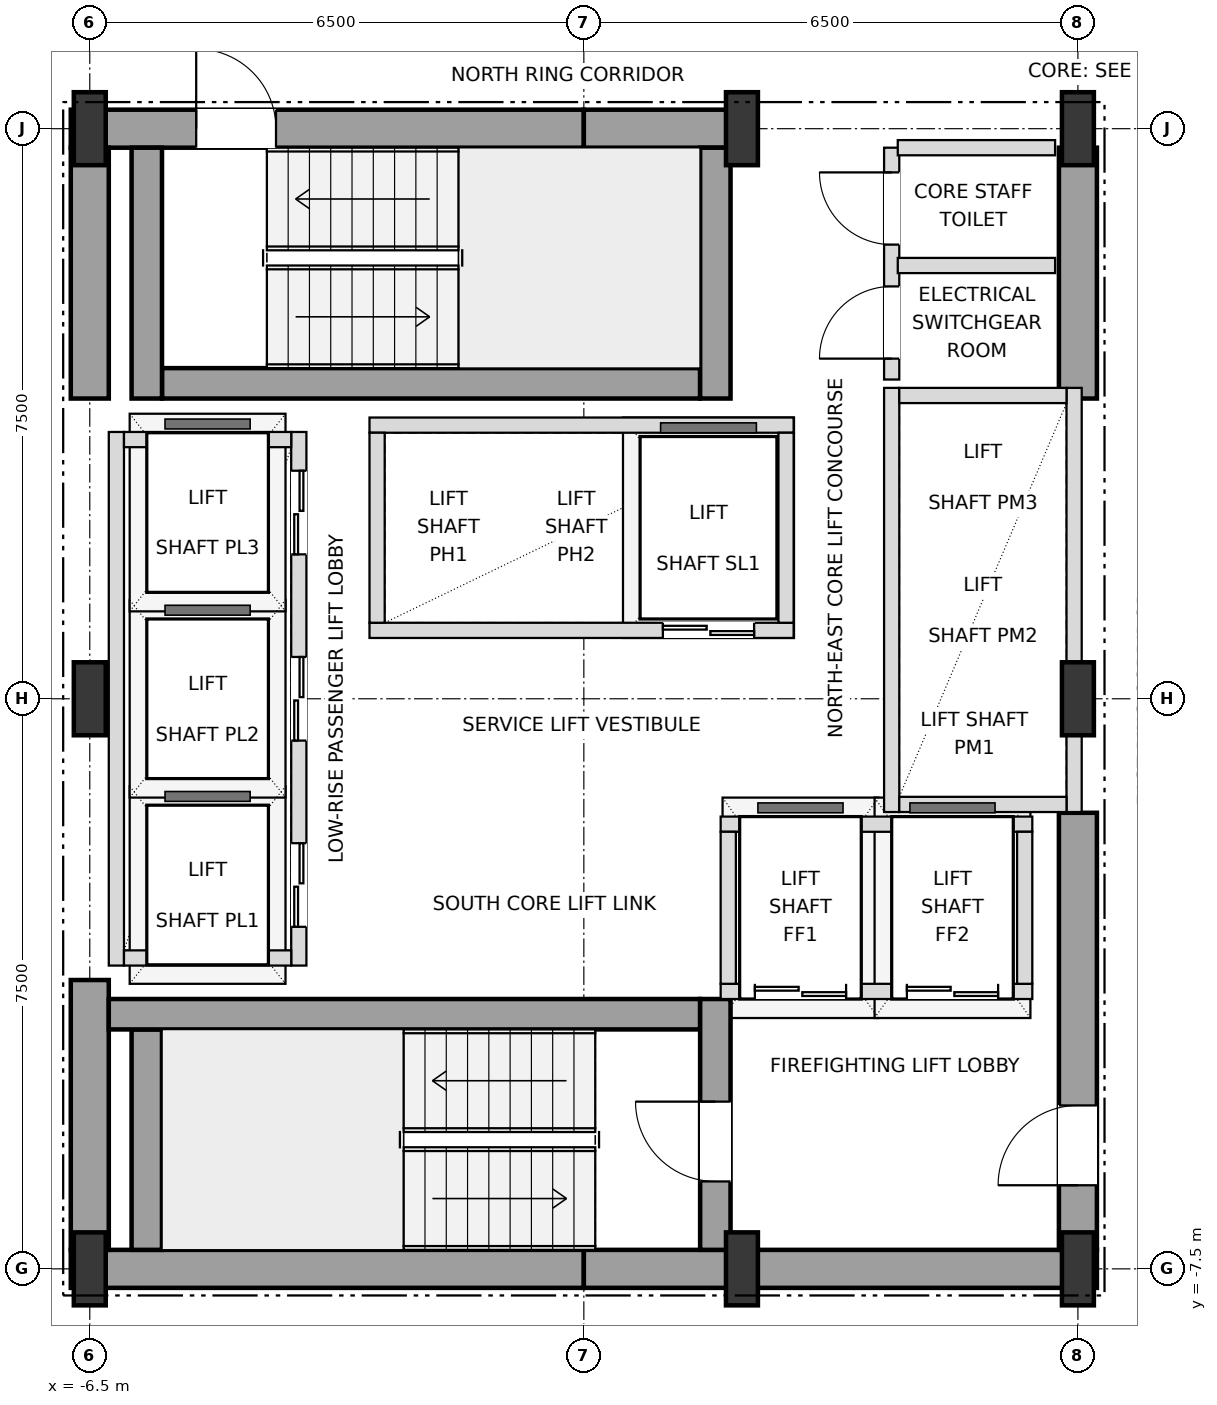
"""IFC4 building model, lengths in metres.
Left out: names, types, materials, properties, quantities, classifications, styles, units other than length and angle.
Written with IfcOpenShell. Run it as: python <this file> out.ifc"""

import sys

from ifc_helpers import new_model, si_unit, direction, frame, frame_2d, origin, origin_2d, place, context, subcontext, project, spatial, rectangle, i_section, extrude, element, fill, save


model = new_model("IFC4")
c1 = context("Model", 3, precision=1e-05, world=origin(), true_north=direction((0.0, 1.0)))
c2 = subcontext(c1, "Body", "Model", "MODEL_VIEW")
j1 = project(units=[si_unit("LENGTHUNIT", "METRE"), si_unit("PLANEANGLEUNIT", "RADIAN")], contexts=[c1])
p1 = place(None, origin())
s1 = spatial("IfcSite", under=j1, at=p1, CompositionType="ELEMENT")
p2 = place(p1, origin())
s2 = spatial("IfcBuilding", under=s1, at=p2, CompositionType="ELEMENT")
p3 = place(p2, frame((0.0, 0.0, 61.2)))
s3 = spatial("IfcBuildingStorey", under=s2, at=p3, CompositionType="ELEMENT", Elevation=61.2)
for number, where, z_axis, x_axis in (
    (1, (-6.5, -7.5, 0.0), (0.0, 0.0, 1.0), (1.0, 0.0, 0.0)),
    (2, (2.08, -7.5, 0.0), (0.0, 0.0, 1.0), (1.0, 0.0, 0.0)),
    (3, (6.5, -7.5, 0.0), (0.0, 0.0, 1.0), (1.0, 0.0, 0.0)),
    (4, (-6.5, 0.0, 0.0), (0.0, 0.0, 1.0), (1.0, 0.0, 0.0)),
    (5, (6.5, 0.0, 0.0), (0.0, 0.0, 1.0), (1.0, 0.0, 0.0)),
    (6, (-6.5, 7.5, 0.0), (0.0, 0.0, 1.0), (1.0, 0.0, 0.0)),
    (7, (2.08, 7.5, 0.0), (0.0, 0.0, 1.0), (1.0, 0.0, 0.0)),
    (8, (6.5, 7.5, 0.0), (0.0, 0.0, 1.0), (1.0, 0.0, 0.0)),
):
    element("IfcColumn", number, at=place(p3, frame(where, z_axis=z_axis, x_axis=x_axis)), inside=s3, PredefinedType="COLUMN", context=c2, shape_type="SweptSolid", body=[
        extrude(i_section(OverallWidth=0.42, OverallDepth=0.96, WebThickness=0.022, FlangeThickness=0.034, at=origin_2d()), origin(), (0.0, 0.0, 1.0), 3.6),
    ])
for number, where, z_axis, x_axis in (
    (9, (-6.75, -7.5, 0.0), (0.0, 0.0, 1.0), (1.0, 0.0, 0.0)),
    (10, (0.0, -7.5, 0.0), (0.0, 0.0, 1.0), (1.0, 0.0, 0.0)),
):
    element("IfcWall", number, at=place(p3, frame(where, z_axis=z_axis, x_axis=x_axis)), inside=s3, PredefinedType="SHEAR", context=c2, shape_type="SweptSolid", body=[
        extrude(rectangle(XDim=6.75, YDim=0.5, at=frame_2d((3.375, 0.0))), origin(), (0.0, 0.0, 1.0), 3.38),
    ])
p4 = place(p3, frame((-6.75, 7.5, 0.0), z_axis=(0.0, 0.0, 1.0), x_axis=(1.0, 0.0, 0.0)))
e11 = element("IfcWall", 11, at=p4, inside=s3, PredefinedType="SHEAR", context=c2, shape_type="SweptSolid", body=[
    extrude(rectangle(XDim=6.75, YDim=0.5, at=frame_2d((3.375, 0.0))), origin(), (0.0, 0.0, 1.0), 3.38),
])
p5 = place(p4, frame((1.65, 0.0, 0.0)))
e12 = element("IfcOpeningElement", 12, at=p5, cuts=e11, PredefinedType="OPENING", context=c2, shape_type="SweptSolid", body=[
    extrude(rectangle(XDim=1.05, YDim=2.15, at=frame_2d((0.525, 1.075))), frame((0.0, 0.26, 0.0), z_axis=(0.0, -1.0, 0.0), x_axis=(1.0, 0.0, 0.0)), (0.0, 0.0, 1.0), 0.52),
])
p6 = place(p3, frame((0.0, 7.5, 0.0), z_axis=(0.0, 0.0, 1.0), x_axis=(1.0, 0.0, 0.0)))
e13 = element("IfcWall", 13, at=p6, inside=s3, PredefinedType="SHEAR", context=c2, shape_type="SweptSolid", body=[
    extrude(rectangle(XDim=2.08, YDim=0.5, at=frame_2d((1.04, 0.0))), origin(), (0.0, 0.0, 1.0), 3.38),
])
p7 = place(p3, frame((-6.5, -7.25, 0.0), z_axis=(0.0, 0.0, 1.0), x_axis=(0.0, 1.0, 0.0)))
e14 = element("IfcWall", 14, at=p7, inside=s3, PredefinedType="SHEAR", context=c2, shape_type="SweptSolid", body=[
    extrude(rectangle(XDim=3.55, YDim=0.5, at=frame_2d((1.775, 0.0))), origin(), (0.0, 0.0, 1.0), 3.38),
])
p8 = place(p3, frame((-6.5, 3.95, 0.0), z_axis=(0.0, 0.0, 1.0), x_axis=(0.0, 1.0, 0.0)))
e15 = element("IfcWall", 15, at=p8, inside=s3, PredefinedType="SHEAR", context=c2, shape_type="SweptSolid", body=[
    extrude(rectangle(XDim=3.3, YDim=0.5, at=frame_2d((1.65, 0.0))), origin(), (0.0, 0.0, 1.0), 3.38),
])
p9 = place(p3, frame((6.5, -7.25, 0.0), z_axis=(0.0, 0.0, 1.0), x_axis=(0.0, 1.0, 0.0)))
e16 = element("IfcWall", 16, at=p9, inside=s3, PredefinedType="SHEAR", context=c2, shape_type="SweptSolid", body=[
    extrude(rectangle(XDim=5.75, YDim=0.5, at=frame_2d((2.875, 0.0))), origin(), (0.0, 0.0, 1.0), 3.38),
])
p10 = place(p9, frame((0.85, 0.0, 0.0)))
e17 = element("IfcOpeningElement", 17, at=p10, cuts=e16, PredefinedType="OPENING", context=c2, shape_type="SweptSolid", body=[
    extrude(rectangle(XDim=1.05, YDim=2.15, at=frame_2d((0.525, 1.075))), frame((0.0, 0.26, 0.0), z_axis=(0.0, -1.0, 0.0), x_axis=(1.0, 0.0, 0.0)), (0.0, 0.0, 1.0), 0.52),
])
p11 = place(p3, frame((6.5, 3.95, 0.0), z_axis=(0.0, 0.0, 1.0), x_axis=(0.0, 1.0, 0.0)))
e18 = element("IfcWall", 18, at=p11, inside=s3, PredefinedType="SHEAR", context=c2, shape_type="SweptSolid", body=[
    extrude(rectangle(XDim=3.3, YDim=0.5, at=frame_2d((1.65, 0.0))), origin(), (0.0, 0.0, 1.0), 3.38),
])
p12 = place(p3, frame((-5.75, -7.25, 0.0), z_axis=(0.0, 0.0, 1.0), x_axis=(0.0, 1.0, 0.0)))
e19 = element("IfcWall", 19, at=p12, inside=s3, PredefinedType="SHEAR", context=c2, shape_type="SweptSolid", body=[
    extrude(rectangle(XDim=2.9, YDim=0.4, at=frame_2d((1.45, 0.0))), origin(), (0.0, 0.0, 1.0), 3.38),
])
p13 = place(p3, frame((-6.25, -4.15, 0.0), z_axis=(0.0, 0.0, 1.0), x_axis=(1.0, 0.0, 0.0)))
e20 = element("IfcWall", 20, at=p13, inside=s3, PredefinedType="SHEAR", context=c2, shape_type="SweptSolid", body=[
    extrude(rectangle(XDim=7.78, YDim=0.4, at=frame_2d((3.89, 0.0))), origin(), (0.0, 0.0, 1.0), 3.38),
])
p14 = place(p3, frame((1.73, -7.25, 0.0), z_axis=(0.0, 0.0, 1.0), x_axis=(0.0, 1.0, 0.0)))
e21 = element("IfcWall", 21, at=p14, inside=s3, PredefinedType="SHEAR", context=c2, shape_type="SweptSolid", body=[
    extrude(rectangle(XDim=3.3, YDim=0.4, at=frame_2d((1.65, 0.0))), origin(), (0.0, 0.0, 1.0), 3.38),
])
p15 = place(p14, frame((0.9, 0.0, 0.0)))
e22 = element("IfcOpeningElement", 22, at=p15, cuts=e21, PredefinedType="OPENING", context=c2, shape_type="SweptSolid", body=[
    extrude(rectangle(XDim=1.05, YDim=2.15, at=frame_2d((0.525, 1.075))), frame((0.0, 0.21, 0.0), z_axis=(0.0, -1.0, 0.0), x_axis=(1.0, 0.0, 0.0)), (0.0, 0.0, 1.0), 0.42),
])
p16 = place(p3, frame((-5.55, 4.15, 0.0), z_axis=(0.0, 0.0, 1.0), x_axis=(1.0, 0.0, 0.0)))
e23 = element("IfcWall", 23, at=p16, inside=s3, PredefinedType="SHEAR", context=c2, shape_type="SweptSolid", body=[
    extrude(rectangle(XDim=7.08, YDim=0.4, at=frame_2d((3.54, 0.0))), origin(), (0.0, 0.0, 1.0), 3.38),
])
for number, where, z_axis, x_axis in (
    (24, (1.73, 3.95, 0.0), (0.0, 0.0, 1.0), (0.0, 1.0, 0.0)),
    (25, (-5.75, 3.95, 0.0), (0.0, 0.0, 1.0), (0.0, 1.0, 0.0)),
):
    element("IfcWall", number, at=place(p3, frame(where, z_axis=z_axis, x_axis=x_axis)), inside=s3, PredefinedType="SHEAR", context=c2, shape_type="SweptSolid", body=[
        extrude(rectangle(XDim=3.3, YDim=0.4, at=frame_2d((1.65, 0.0))), origin(), (0.0, 0.0, 1.0), 3.38),
    ])
p17 = place(p3, frame((-3.75, -3.51, 0.0), z_axis=(0.0, 0.0, 1.0), x_axis=(0.0, 1.0, 0.0)))
e26 = element("IfcWall", 26, at=p17, inside=s3, PredefinedType="SOLIDWALL", context=c2, shape_type="SweptSolid", body=[
    extrude(rectangle(XDim=7.02, YDim=0.2, at=frame_2d((3.51, 0.0))), origin(), (0.0, 0.0, 1.0), 3.38),
])
p18 = place(p17, frame((0.51, 0.0, 0.0)))
e27 = element("IfcOpeningElement", 27, at=p18, cuts=e26, PredefinedType="OPENING", context=c2, shape_type="SweptSolid", body=[
    extrude(rectangle(XDim=1.1, YDim=2.15, at=frame_2d((0.55, 1.075))), frame((0.0, 0.11, 0.0), z_axis=(0.0, -1.0, 0.0), x_axis=(1.0, 0.0, 0.0)), (0.0, 0.0, 1.0), 0.22),
])
p19 = place(p17, frame((2.96, 0.0, 0.0)))
e28 = element("IfcOpeningElement", 28, at=p19, cuts=e26, PredefinedType="OPENING", context=c2, shape_type="SweptSolid", body=[
    extrude(rectangle(XDim=1.1, YDim=2.15, at=frame_2d((0.55, 1.075))), frame((0.0, 0.11, 0.0), z_axis=(0.0, -1.0, 0.0), x_axis=(1.0, 0.0, 0.0)), (0.0, 0.0, 1.0), 0.22),
])
p20 = place(p17, frame((5.41, 0.0, 0.0)))
e29 = element("IfcOpeningElement", 29, at=p20, cuts=e26, PredefinedType="OPENING", context=c2, shape_type="SweptSolid", body=[
    extrude(rectangle(XDim=1.1, YDim=2.15, at=frame_2d((0.55, 1.075))), frame((0.0, 0.11, 0.0), z_axis=(0.0, -1.0, 0.0), x_axis=(1.0, 0.0, 0.0)), (0.0, 0.0, 1.0), 0.22),
])
p21 = place(p3, frame((-6.15, -3.51, 0.0), z_axis=(0.0, 0.0, 1.0), x_axis=(0.0, 1.0, 0.0)))
e30 = element("IfcWall", 30, at=p21, inside=s3, PredefinedType="SOLIDWALL", context=c2, shape_type="SweptSolid", body=[
    extrude(rectangle(XDim=7.02, YDim=0.2, at=frame_2d((3.51, 0.0))), origin(), (0.0, 0.0, 1.0), 3.38),
])
for number, where, z_axis, x_axis in (
    (31, (-6.05, -3.41, 0.0), (0.0, 0.0, 1.0), (1.0, 0.0, 0.0)),
    (32, (-6.05, 3.41, 0.0), (0.0, 0.0, 1.0), (1.0, 0.0, 0.0)),
):
    element("IfcWall", number, at=place(p3, frame(where, z_axis=z_axis, x_axis=x_axis)), inside=s3, PredefinedType="SOLIDWALL", context=c2, shape_type="SweptSolid", body=[
        extrude(rectangle(XDim=2.2, YDim=0.2, at=frame_2d((1.1, 0.0))), origin(), (0.0, 0.0, 1.0), 3.38),
    ])
p22 = place(p3, frame((4.05, -1.49, 0.0), z_axis=(0.0, 0.0, 1.0), x_axis=(0.0, 1.0, 0.0)))
e33 = element("IfcWall", 33, at=p22, inside=s3, PredefinedType="SOLIDWALL", context=c2, shape_type="SweptSolid", body=[
    extrude(rectangle(XDim=5.58, YDim=0.2, at=frame_2d((2.79, 0.0))), origin(), (0.0, 0.0, 1.0), 3.38),
])
p23 = place(p3, frame((6.45, -1.49, 0.0), z_axis=(0.0, 0.0, 1.0), x_axis=(0.0, 1.0, 0.0)))
e34 = element("IfcWall", 34, at=p23, inside=s3, PredefinedType="SOLIDWALL", context=c2, shape_type="SweptSolid", body=[
    extrude(rectangle(XDim=5.58, YDim=0.2, at=frame_2d((2.79, 0.0))), origin(), (0.0, 0.0, 1.0), 2.816),
])
for number, where, z_axis, x_axis in (
    (35, (4.15, -1.39, 0.0), (0.0, 0.0, 1.0), (1.0, 0.0, 0.0)),
    (36, (4.15, 3.99, 0.0), (0.0, 0.0, 1.0), (1.0, 0.0, 0.0)),
):
    element("IfcWall", number, at=place(p3, frame(where, z_axis=z_axis, x_axis=x_axis)), inside=s3, PredefinedType="SOLIDWALL", context=c2, shape_type="SweptSolid", body=[
        extrude(rectangle(XDim=2.2, YDim=0.2, at=frame_2d((1.1, 0.0))), origin(), (0.0, 0.0, 1.0), 3.38),
    ])
p24 = place(p3, frame((-2.82, 0.9, 0.0), z_axis=(0.0, 0.0, 1.0), x_axis=(1.0, 0.0, 0.0)))
e37 = element("IfcWall", 37, at=p24, inside=s3, PredefinedType="SOLIDWALL", context=c2, shape_type="SweptSolid", body=[
    extrude(rectangle(XDim=5.58, YDim=0.2, at=frame_2d((2.79, 0.0))), origin(), (0.0, 0.0, 1.0), 3.38),
])
p25 = place(p24, frame((3.86, 0.0, 0.0)))
e38 = element("IfcOpeningElement", 38, at=p25, cuts=e37, PredefinedType="OPENING", context=c2, shape_type="SweptSolid", body=[
    extrude(rectangle(XDim=1.2, YDim=2.2, at=frame_2d((0.6, 1.1))), frame((0.0, 0.11, 0.0), z_axis=(0.0, -1.0, 0.0), x_axis=(1.0, 0.0, 0.0)), (0.0, 0.0, 1.0), 0.22),
])
p26 = place(p3, frame((-2.82, 3.6, 0.0), z_axis=(0.0, 0.0, 1.0), x_axis=(1.0, 0.0, 0.0)))
e39 = element("IfcWall", 39, at=p26, inside=s3, PredefinedType="SOLIDWALL", context=c2, shape_type="SweptSolid", body=[
    extrude(rectangle(XDim=5.58, YDim=0.2, at=frame_2d((2.79, 0.0))), origin(), (0.0, 0.0, 1.0), 3.38),
])
for number, where, z_axis, x_axis in (
    (40, (-2.72, 1.0, 0.0), (0.0, 0.0, 1.0), (0.0, 1.0, 0.0)),
    (41, (2.66, 1.0, 0.0), (0.0, 0.0, 1.0), (0.0, 1.0, 0.0)),
):
    element("IfcWall", number, at=place(p3, frame(where, z_axis=z_axis, x_axis=x_axis)), inside=s3, PredefinedType="SOLIDWALL", context=c2, shape_type="SweptSolid", body=[
        extrude(rectangle(XDim=2.5, YDim=0.2, at=frame_2d((1.25, 0.0))), origin(), (0.0, 0.0, 1.0), 3.38),
    ])
p27 = place(p3, frame((1.8, -3.85, 0.0), z_axis=(0.0, 0.0, 1.0), x_axis=(1.0, 0.0, 0.0)))
e42 = element("IfcWall", 42, at=p27, inside=s3, PredefinedType="SOLIDWALL", context=c2, shape_type="SweptSolid", body=[
    extrude(rectangle(XDim=4.1, YDim=0.2, at=frame_2d((2.05, 0.0))), origin(), (0.0, 0.0, 1.0), 3.38),
])
p28 = place(p27, frame((0.45, 0.0, 0.0)))
e43 = element("IfcOpeningElement", 43, at=p28, cuts=e42, PredefinedType="OPENING", context=c2, shape_type="SweptSolid", body=[
    extrude(rectangle(XDim=1.2, YDim=2.2, at=frame_2d((0.6, 1.1))), frame((0.0, 0.11, 0.0), z_axis=(0.0, -1.0, 0.0), x_axis=(1.0, 0.0, 0.0)), (0.0, 0.0, 1.0), 0.22),
])
p29 = place(p27, frame((2.45, 0.0, 0.0)))
e44 = element("IfcOpeningElement", 44, at=p29, cuts=e42, PredefinedType="OPENING", context=c2, shape_type="SweptSolid", body=[
    extrude(rectangle(XDim=1.2, YDim=2.2, at=frame_2d((0.6, 1.1))), frame((0.0, 0.11, 0.0), z_axis=(0.0, -1.0, 0.0), x_axis=(1.0, 0.0, 0.0)), (0.0, 0.0, 1.0), 0.22),
])
p30 = place(p3, frame((1.8, -1.65, 0.0), z_axis=(0.0, 0.0, 1.0), x_axis=(1.0, 0.0, 0.0)))
e45 = element("IfcWall", 45, at=p30, inside=s3, PredefinedType="SOLIDWALL", context=c2, shape_type="SweptSolid", body=[
    extrude(rectangle(XDim=4.1, YDim=0.2, at=frame_2d((2.05, 0.0))), origin(), (0.0, 0.0, 1.0), 3.38),
])
for number, where, z_axis, x_axis in (
    (46, (1.9, -3.75, 0.0), (0.0, 0.0, 1.0), (0.0, 1.0, 0.0)),
    (47, (5.8, -3.75, 0.0), (0.0, 0.0, 1.0), (0.0, 1.0, 0.0)),
):
    element("IfcWall", number, at=place(p3, frame(where, z_axis=z_axis, x_axis=x_axis)), inside=s3, PredefinedType="SOLIDWALL", context=c2, shape_type="SweptSolid", body=[
        extrude(rectangle(XDim=2.0, YDim=0.2, at=frame_2d((1.0, 0.0))), origin(), (0.0, 0.0, 1.0), 3.38),
    ])
p31 = place(p3, frame((4.05, 4.2, 0.0), z_axis=(0.0, 0.0, 1.0), x_axis=(0.0, 1.0, 0.0)))
e48 = element("IfcWall", 48, at=p31, inside=s3, PredefinedType="SOLIDWALL", context=c2, shape_type="SweptSolid", body=[
    extrude(rectangle(XDim=3.05, YDim=0.2, at=frame_2d((1.525, 0.0))), origin(), (0.0, 0.0, 1.0), 3.38),
])
p32 = place(p31, frame((0.275, 0.0, 0.0)))
e49 = element("IfcOpeningElement", 49, at=p32, cuts=e48, PredefinedType="OPENING", context=c2, shape_type="SweptSolid", body=[
    extrude(rectangle(XDim=0.95, YDim=2.15, at=frame_2d((0.475, 1.075))), frame((0.0, 0.11, 0.0), z_axis=(0.0, -1.0, 0.0), x_axis=(1.0, 0.0, 0.0)), (0.0, 0.0, 1.0), 0.22),
])
p33 = place(p31, frame((1.775, 0.0, 0.0)))
e50 = element("IfcOpeningElement", 50, at=p33, cuts=e48, PredefinedType="OPENING", context=c2, shape_type="SweptSolid", body=[
    extrude(rectangle(XDim=0.95, YDim=2.15, at=frame_2d((0.475, 1.075))), frame((0.0, 0.11, 0.0), z_axis=(0.0, -1.0, 0.0), x_axis=(1.0, 0.0, 0.0)), (0.0, 0.0, 1.0), 0.22),
])
for number, where, z_axis, x_axis in (
    (51, (4.13, 5.7, 0.0), (0.0, 0.0, 1.0), (1.0, 0.0, 0.0)),
    (52, (4.13, 7.25, 0.0), (0.0, 0.0, 1.0), (1.0, 0.0, 0.0)),
):
    element("IfcWall", number, at=place(p3, frame(where, z_axis=z_axis, x_axis=x_axis)), inside=s3, PredefinedType="SOLIDWALL", context=c2, shape_type="SweptSolid", body=[
        extrude(rectangle(XDim=2.07, YDim=0.2, at=frame_2d((1.035, 0.0))), origin(), (0.0, 0.0, 1.0), 3.38),
    ])
p34 = place(p10, origin())
e53 = element("IfcDoor", 53, at=p34, inside=s3, OperationType="SINGLE_SWING_LEFT", PredefinedType="DOOR", context=c2, shape_type="SweptSolid", body=[
    extrude(rectangle(XDim=1.05, YDim=2.15, at=frame_2d((0.525, 1.075))), frame((0.0, 0.025, 0.0), z_axis=(0.0, -1.0, 0.0), x_axis=(1.0, 0.0, 0.0)), (0.0, 0.0, 1.0), 0.05),
])
fill(e17, e53)
p35 = place(p15, origin())
e54 = element("IfcDoor", 54, at=p35, inside=s3, OperationType="SINGLE_SWING_RIGHT", PredefinedType="DOOR", context=c2, shape_type="SweptSolid", body=[
    extrude(rectangle(XDim=1.05, YDim=2.15, at=frame_2d((0.525, 1.075))), frame((0.0, 0.025, 0.0), z_axis=(0.0, -1.0, 0.0), x_axis=(1.0, 0.0, 0.0)), (0.0, 0.0, 1.0), 0.05),
])
fill(e22, e54)
p36 = place(p5, origin())
e55 = element("IfcDoor", 55, at=p36, inside=s3, OperationType="SINGLE_SWING_LEFT", PredefinedType="DOOR", context=c2, shape_type="SweptSolid", body=[
    extrude(rectangle(XDim=1.05, YDim=2.15, at=frame_2d((0.525, 1.075))), frame((0.0, 0.025, 0.0), z_axis=(0.0, -1.0, 0.0), x_axis=(1.0, 0.0, 0.0)), (0.0, 0.0, 1.0), 0.05),
])
fill(e12, e55)
p37 = place(p18, origin())
e56 = element("IfcDoor", 56, at=p37, inside=s3, OperationType="DOUBLE_DOOR_SLIDING", PredefinedType="DOOR", context=c2, shape_type="SweptSolid", body=[
    extrude(rectangle(XDim=1.1, YDim=2.15, at=frame_2d((0.55, 1.075))), frame((0.0, 0.025, 0.0), z_axis=(0.0, -1.0, 0.0), x_axis=(1.0, 0.0, 0.0)), (0.0, 0.0, 1.0), 0.05),
])
fill(e27, e56)
p38 = place(p19, origin())
e57 = element("IfcDoor", 57, at=p38, inside=s3, OperationType="DOUBLE_DOOR_SLIDING", PredefinedType="DOOR", context=c2, shape_type="SweptSolid", body=[
    extrude(rectangle(XDim=1.1, YDim=2.15, at=frame_2d((0.55, 1.075))), frame((0.0, 0.025, 0.0), z_axis=(0.0, -1.0, 0.0), x_axis=(1.0, 0.0, 0.0)), (0.0, 0.0, 1.0), 0.05),
])
fill(e28, e57)
p39 = place(p20, origin())
e58 = element("IfcDoor", 58, at=p39, inside=s3, OperationType="DOUBLE_DOOR_SLIDING", PredefinedType="DOOR", context=c2, shape_type="SweptSolid", body=[
    extrude(rectangle(XDim=1.1, YDim=2.15, at=frame_2d((0.55, 1.075))), frame((0.0, 0.025, 0.0), z_axis=(0.0, -1.0, 0.0), x_axis=(1.0, 0.0, 0.0)), (0.0, 0.0, 1.0), 0.05),
])
fill(e29, e58)
p40 = place(p25, origin())
e59 = element("IfcDoor", 59, at=p40, inside=s3, OperationType="DOUBLE_DOOR_SLIDING", PredefinedType="DOOR", context=c2, shape_type="SweptSolid", body=[
    extrude(rectangle(XDim=1.2, YDim=2.2, at=frame_2d((0.6, 1.1))), frame((0.0, 0.025, 0.0), z_axis=(0.0, -1.0, 0.0), x_axis=(1.0, 0.0, 0.0)), (0.0, 0.0, 1.0), 0.05),
])
fill(e38, e59)
p41 = place(p28, origin())
e60 = element("IfcDoor", 60, at=p41, inside=s3, OperationType="DOUBLE_DOOR_SLIDING", PredefinedType="DOOR", context=c2, shape_type="SweptSolid", body=[
    extrude(rectangle(XDim=1.2, YDim=2.2, at=frame_2d((0.6, 1.1))), frame((0.0, 0.025, 0.0), z_axis=(0.0, -1.0, 0.0), x_axis=(1.0, 0.0, 0.0)), (0.0, 0.0, 1.0), 0.05),
])
fill(e43, e60)
p42 = place(p29, origin())
e61 = element("IfcDoor", 61, at=p42, inside=s3, OperationType="DOUBLE_DOOR_SLIDING", PredefinedType="DOOR", context=c2, shape_type="SweptSolid", body=[
    extrude(rectangle(XDim=1.2, YDim=2.2, at=frame_2d((0.6, 1.1))), frame((0.0, 0.025, 0.0), z_axis=(0.0, -1.0, 0.0), x_axis=(1.0, 0.0, 0.0)), (0.0, 0.0, 1.0), 0.05),
])
fill(e44, e61)
p43 = place(p32, origin())
e62 = element("IfcDoor", 62, at=p43, inside=s3, OperationType="SINGLE_SWING_LEFT", PredefinedType="DOOR", context=c2, shape_type="SweptSolid", body=[
    extrude(rectangle(XDim=0.95, YDim=2.15, at=frame_2d((0.475, 1.075))), frame((0.0, 0.025, 0.0), z_axis=(0.0, -1.0, 0.0), x_axis=(1.0, 0.0, 0.0)), (0.0, 0.0, 1.0), 0.05),
])
fill(e49, e62)
p44 = place(p33, origin())
e63 = element("IfcDoor", 63, at=p44, inside=s3, OperationType="SINGLE_SWING_RIGHT", PredefinedType="DOOR", context=c2, shape_type="SweptSolid", body=[
    extrude(rectangle(XDim=0.95, YDim=2.15, at=frame_2d((0.475, 1.075))), frame((0.0, 0.025, 0.0), z_axis=(0.0, -1.0, 0.0), x_axis=(1.0, 0.0, 0.0)), (0.0, 0.0, 1.0), 0.05),
])
fill(e50, e63)
save(model, sys.argv[1])
